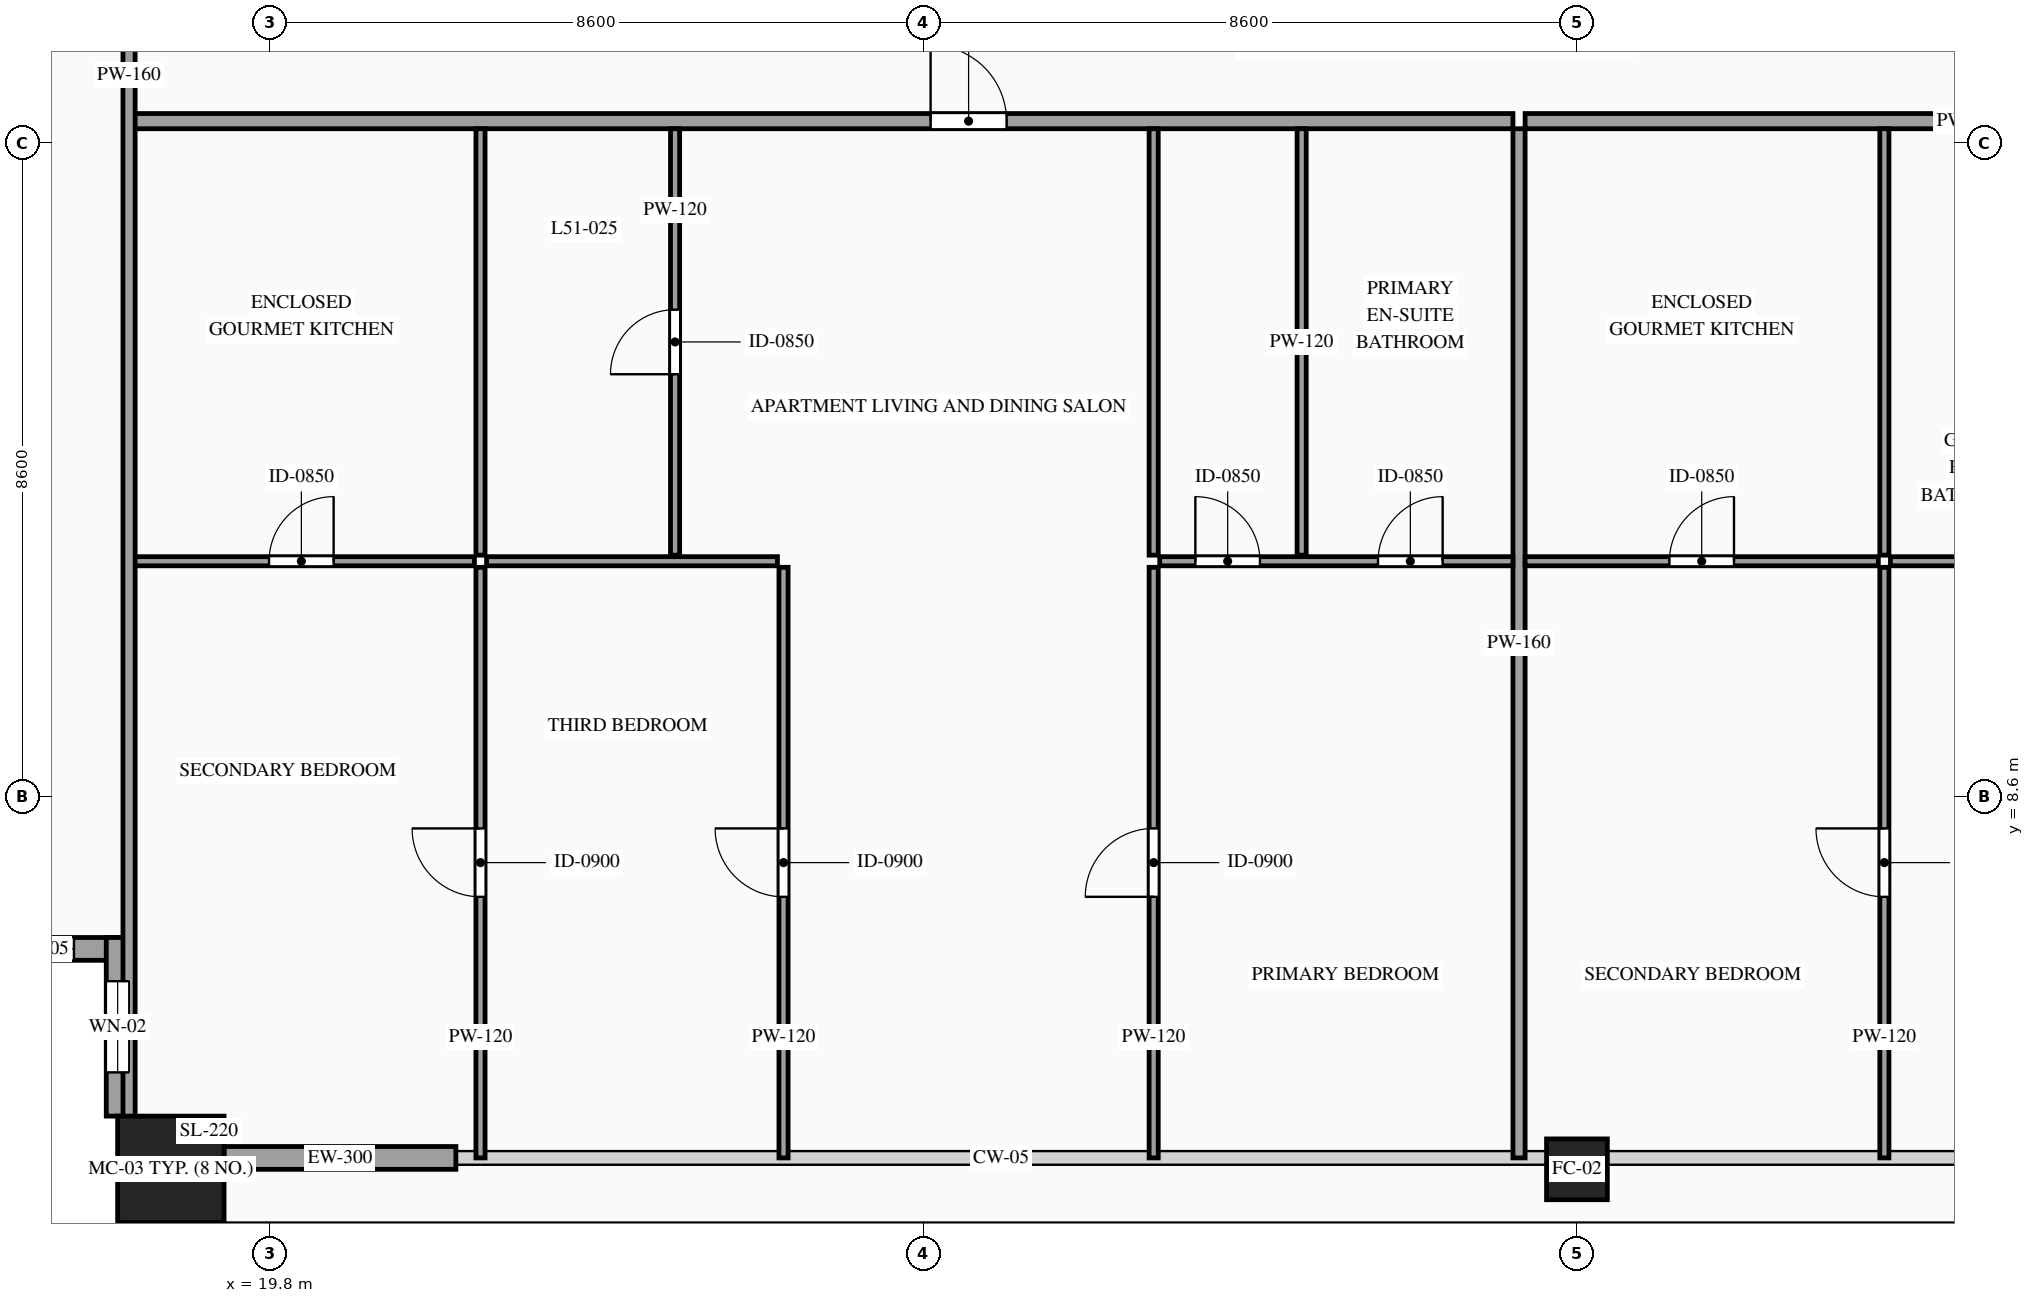
"""IFC4 building model, lengths in metres.
Left out: names, types, materials, properties, quantities, classifications, styles, units other than length and angle.
Written with IfcOpenShell. Run it as: python <this file> out.ifc"""

import sys

from ifc_helpers import new_model, si_unit, direction, frame, frame_2d, origin, origin_2d, place, context, subcontext, project, spatial, rectangle, hollow_rectangle, extrude, source, transform, mapped, element, fill, save


model = new_model("IFC4")
c1 = context("Model", 3, precision=1e-05, world=origin(), true_north=direction((0.0, 1.0)))
c2 = subcontext(c1, "Body", "Model", "MODEL_VIEW")
j1 = project(units=[si_unit("LENGTHUNIT", "METRE"), si_unit("PLANEANGLEUNIT", "RADIAN")], contexts=[c1])
p1 = place(None, origin())
s1 = spatial("IfcSite", under=j1, at=p1, CompositionType="ELEMENT")
p2 = place(p1, origin())
s2 = spatial("IfcBuilding", under=s1, at=p2, CompositionType="ELEMENT")
p3 = place(p2, frame((0.0, 0.0, 195.0)))
s3 = spatial("IfcBuildingStorey", under=s2, at=p3, CompositionType="ELEMENT", Elevation=195.0)
m1 = source(origin(), c2, "Body", "SweptSolid", [
    extrude(hollow_rectangle(XDim=1.4, YDim=1.4, WallThickness=0.06, at=origin_2d()), origin(), (0.0, 0.0, 1.0), 3.5),
])
p4 = place(p3, frame((18.5, 3.7, 0.0), z_axis=(0.0, 0.0, 1.0), x_axis=(1.0, 0.0, 0.0)))
e1 = element("IfcColumn", 1, at=p4, inside=s3, PredefinedType="COLUMN", context=c2, shape_type="MappedRepresentation", body=[
    mapped(m1, transform((0.0, 0.0, 0.0), scale=1.0)),
])
m2 = source(origin(), c2, "Body", "SweptSolid", [
    extrude(hollow_rectangle(XDim=0.8, YDim=0.8, WallThickness=0.036, at=origin_2d()), origin(), (0.0, 0.0, 1.0), 3.5),
])
p5 = place(p3, frame((37.0, 3.7, 0.0), z_axis=(0.0, 0.0, 1.0), x_axis=(1.0, 0.0, 0.0)))
e2 = element("IfcColumn", 2, at=p5, inside=s3, PredefinedType="COLUMN", context=c2, shape_type="MappedRepresentation", body=[
    mapped(m2, transform((0.0, 0.0, 0.0), scale=1.0)),
])
p6 = place(p3, frame((15.6, 6.6, 0.0), z_axis=(0.0, 0.0, 1.0), x_axis=(1.0, 0.0, 0.0)))
e3 = element("IfcWall", 3, at=p6, inside=s3, PredefinedType="SOLIDWALL", context=c2, shape_type="SweptSolid", body=[
    extrude(rectangle(XDim=2.35, YDim=0.3, at=frame_2d((1.175, 0.0))), origin(), (0.0, 0.0, 1.0), 3.28),
])
p7 = place(p6, frame((0.725, 0.0, 0.85)))
e4 = element("IfcOpeningElement", 4, at=p7, cuts=e3, PredefinedType="OPENING", context=c2, shape_type="SweptSolid", body=[
    extrude(rectangle(XDim=0.9, YDim=1.5, at=frame_2d((0.45, 0.75))), frame((0.0, 0.165, 0.0), z_axis=(0.0, -1.0, 0.0), x_axis=(1.0, 0.0, 0.0)), (0.0, 0.0, 1.0), 0.33),
])
p8 = place(p3, frame((17.8, 6.75, 0.0), z_axis=(0.0, 0.0, 1.0), x_axis=(0.0, -1.0, 0.0)))
e5 = element("IfcWall", 5, at=p8, inside=s3, PredefinedType="SOLIDWALL", context=c2, shape_type="SweptSolid", body=[
    extrude(rectangle(XDim=2.35, YDim=0.3, at=frame_2d((1.175, 0.0))), origin(), (0.0, 0.0, 1.0), 3.28),
])
p9 = place(p8, frame((0.575, 0.0, 0.85)))
e6 = element("IfcOpeningElement", 6, at=p9, cuts=e5, PredefinedType="OPENING", context=c2, shape_type="SweptSolid", body=[
    extrude(rectangle(XDim=1.2, YDim=2.1, at=frame_2d((0.6, 1.05))), frame((0.0, 0.165, 0.0), z_axis=(0.0, -1.0, 0.0), x_axis=(1.0, 0.0, 0.0)), (0.0, 0.0, 1.0), 0.33),
])
m3 = source(origin(), c2, "Body", "SweptSolid", [
    extrude(rectangle(XDim=3.05, YDim=0.3, at=frame_2d((1.525, 0.0))), origin(), (0.0, 0.0, 1.0), 2.835),
])
p10 = place(p3, frame((19.2, 3.85, 0.0), z_axis=(0.0, 0.0, 1.0), x_axis=(1.0, 0.0, 0.0)))
e7 = element("IfcWall", 7, at=p10, inside=s3, PredefinedType="SOLIDWALL", context=c2, shape_type="MappedRepresentation", body=[
    mapped(m3, transform((0.0, 0.0, 0.0), scale=1.0)),
])
p11 = place(p3, frame((17.94, 17.49, 0.0), z_axis=(0.0, 0.0, 1.0), x_axis=(1.0, 0.0, 0.0)))
e8 = element("IfcWall", 8, at=p11, inside=s3, PredefinedType="PARTITIONING", context=c2, shape_type="SweptSolid", body=[
    extrude(rectangle(XDim=18.218, YDim=0.2, at=frame_2d((9.109, 0.0))), origin(), (0.0, 0.0, 1.0), 3.28),
])
p12 = place(p11, frame((10.556, 0.0, 0.0)))
e9 = element("IfcOpeningElement", 9, at=p12, cuts=e8, PredefinedType="OPENING", context=c2, shape_type="SweptSolid", body=[
    extrude(rectangle(XDim=1.0, YDim=2.2, at=frame_2d((0.5, 1.1))), frame((0.0, 0.115, 0.0), z_axis=(0.0, -1.0, 0.0), x_axis=(1.0, 0.0, 0.0)), (0.0, 0.0, 1.0), 0.23),
])
m4 = source(origin(), c2, "Body", "SweptSolid", [
    extrude(rectangle(XDim=13.54, YDim=0.16, at=frame_2d((6.77, 0.0))), origin(), (0.0, 0.0, 1.0), 3.28),
])
p13 = place(p3, frame((36.238, 3.85, 0.0), z_axis=(0.0, 0.0, 1.0), x_axis=(0.0, 1.0, 0.0)))
e10 = element("IfcWall", 10, at=p13, inside=s3, PredefinedType="PARTITIONING", context=c2, shape_type="MappedRepresentation", body=[
    mapped(m4, transform((0.0, 0.0, 0.0), scale=1.0)),
])
p14 = place(p3, frame((17.94, 11.7, 0.0), z_axis=(0.0, 0.0, 1.0), x_axis=(1.0, 0.0, 0.0)))
e11 = element("IfcWall", 11, at=p14, inside=s3, PredefinedType="PARTITIONING", context=c2, shape_type="SweptSolid", body=[
    extrude(rectangle(XDim=4.554, YDim=0.12, at=frame_2d((2.277, 0.0))), origin(), (0.0, 0.0, 1.0), 3.28),
])
p15 = place(p14, frame((1.852, 0.0, 0.0)))
e12 = element("IfcOpeningElement", 12, at=p15, cuts=e11, PredefinedType="OPENING", context=c2, shape_type="SweptSolid", body=[
    extrude(rectangle(XDim=0.85, YDim=2.1, at=frame_2d((0.425, 1.05))), frame((0.0, 0.075, 0.0), z_axis=(0.0, -1.0, 0.0), x_axis=(1.0, 0.0, 0.0)), (0.0, 0.0, 1.0), 0.15),
])
m5 = source(origin(), c2, "Body", "SweptSolid", [
    extrude(rectangle(XDim=5.61, YDim=0.12, at=frame_2d((2.805, 0.0))), origin(), (0.0, 0.0, 1.0), 3.28),
])
p16 = place(p3, frame((22.574, 11.78, 0.0), z_axis=(0.0, 0.0, 1.0), x_axis=(0.0, 1.0, 0.0)))
e13 = element("IfcWall", 13, at=p16, inside=s3, PredefinedType="PARTITIONING", context=c2, shape_type="MappedRepresentation", body=[
    mapped(m5, transform((0.0, 0.0, 0.0), scale=1.0)),
])
p17 = place(p3, frame((25.134, 11.78, 0.0), z_axis=(0.0, 0.0, 1.0), x_axis=(0.0, 1.0, 0.0)))
e14 = element("IfcWall", 14, at=p17, inside=s3, PredefinedType="PARTITIONING", context=c2, shape_type="SweptSolid", body=[
    extrude(rectangle(XDim=5.61, YDim=0.12, at=frame_2d((2.805, 0.0))), origin(), (0.0, 0.0, 1.0), 3.28),
])
p18 = place(p17, frame((2.38, 0.0, 0.0)))
e15 = element("IfcOpeningElement", 15, at=p18, cuts=e14, PredefinedType="OPENING", context=c2, shape_type="SweptSolid", body=[
    extrude(rectangle(XDim=0.85, YDim=2.1, at=frame_2d((0.425, 1.05))), frame((0.0, 0.075, 0.0), z_axis=(0.0, -1.0, 0.0), x_axis=(1.0, 0.0, 0.0)), (0.0, 0.0, 1.0), 0.15),
])
for number, where, z_axis, x_axis in (
    (16, (33.378, 11.78, 0.0), (0.0, 0.0, 1.0), (0.0, 1.0, 0.0)),
    (17, (31.431, 11.78, 0.0), (0.0, 0.0, 1.0), (0.0, 1.0, 0.0)),
):
    element("IfcWall", number, at=place(p3, frame(where, z_axis=z_axis, x_axis=x_axis)), inside=s3, PredefinedType="PARTITIONING", context=c2, shape_type="MappedRepresentation", body=[
        mapped(m5, transform((0.0, 0.0, 0.0), scale=1.0)),
    ])
p19 = place(p3, frame((22.574, 3.85, 0.0), z_axis=(0.0, 0.0, 1.0), x_axis=(0.0, 1.0, 0.0)))
e18 = element("IfcWall", 18, at=p19, inside=s3, PredefinedType="PARTITIONING", context=c2, shape_type="SweptSolid", body=[
    extrude(rectangle(XDim=7.77, YDim=0.12, at=frame_2d((3.885, 0.0))), origin(), (0.0, 0.0, 1.0), 3.28),
])
p20 = place(p19, frame((3.435, 0.0, 0.0)))
e19 = element("IfcOpeningElement", 19, at=p20, cuts=e18, PredefinedType="OPENING", context=c2, shape_type="SweptSolid", body=[
    extrude(rectangle(XDim=0.9, YDim=2.15, at=frame_2d((0.45, 1.075))), frame((0.0, 0.075, 0.0), z_axis=(0.0, -1.0, 0.0), x_axis=(1.0, 0.0, 0.0)), (0.0, 0.0, 1.0), 0.15),
])
p21 = place(p3, frame((31.511, 11.7, 0.0), z_axis=(0.0, 0.0, 1.0), x_axis=(1.0, 0.0, 0.0)))
e20 = element("IfcWall", 20, at=p21, inside=s3, PredefinedType="PARTITIONING", context=c2, shape_type="SweptSolid", body=[
    extrude(rectangle(XDim=4.647, YDim=0.12, at=frame_2d((2.323, 0.0))), origin(), (0.0, 0.0, 1.0), 2.875),
])
p22 = place(p21, frame((2.872, 0.0, 0.0)))
e21 = element("IfcOpeningElement", 21, at=p22, cuts=e20, PredefinedType="OPENING", context=c2, shape_type="SweptSolid", body=[
    extrude(rectangle(XDim=0.85, YDim=2.1, at=frame_2d((0.425, 1.05))), frame((0.0, 0.075, 0.0), z_axis=(0.0, -1.0, 0.0), x_axis=(1.0, 0.0, 0.0)), (0.0, 0.0, 1.0), 0.15),
])
p23 = place(p21, frame((0.469, 0.0, 0.0)))
e22 = element("IfcOpeningElement", 22, at=p23, cuts=e20, PredefinedType="OPENING", context=c2, shape_type="SweptSolid", body=[
    extrude(rectangle(XDim=0.85, YDim=2.1, at=frame_2d((0.425, 1.05))), frame((0.0, 0.075, 0.0), z_axis=(0.0, -1.0, 0.0), x_axis=(1.0, 0.0, 0.0)), (0.0, 0.0, 1.0), 0.15),
])
p24 = place(p3, frame((31.431, 3.85, 0.0), z_axis=(0.0, 0.0, 1.0), x_axis=(0.0, 1.0, 0.0)))
e23 = element("IfcWall", 23, at=p24, inside=s3, PredefinedType="PARTITIONING", context=c2, shape_type="SweptSolid", body=[
    extrude(rectangle(XDim=7.77, YDim=0.12, at=frame_2d((3.885, 0.0))), origin(), (0.0, 0.0, 1.0), 3.28),
])
p25 = place(p24, frame((3.435, 0.0, 0.0)))
e24 = element("IfcOpeningElement", 24, at=p25, cuts=e23, PredefinedType="OPENING", context=c2, shape_type="SweptSolid", body=[
    extrude(rectangle(XDim=0.9, YDim=2.15, at=frame_2d((0.45, 1.075))), frame((0.0, 0.075, 0.0), z_axis=(0.0, -1.0, 0.0), x_axis=(1.0, 0.0, 0.0)), (0.0, 0.0, 1.0), 0.15),
])
m6 = source(origin(), c2, "Body", "SweptSolid", [
    extrude(rectangle(XDim=3.827, YDim=0.12, at=frame_2d((1.914, 0.0))), origin(), (0.0, 0.0, 1.0), 2.875),
])
p26 = place(p3, frame((22.654, 11.7, 0.0), z_axis=(0.0, 0.0, 1.0), x_axis=(1.0, 0.0, 0.0)))
e25 = element("IfcWall", 25, at=p26, inside=s3, PredefinedType="PARTITIONING", context=c2, shape_type="MappedRepresentation", body=[
    mapped(m6, transform((0.0, 0.0, 0.0), scale=1.0)),
])
p27 = place(p3, frame((26.561, 3.85, 0.0), z_axis=(0.0, 0.0, 1.0), x_axis=(0.0, 1.0, 0.0)))
e26 = element("IfcWall", 26, at=p27, inside=s3, PredefinedType="PARTITIONING", context=c2, shape_type="SweptSolid", body=[
    extrude(rectangle(XDim=7.77, YDim=0.12, at=frame_2d((3.885, 0.0))), origin(), (0.0, 0.0, 1.0), 3.28),
])
p28 = place(p27, frame((3.435, 0.0, 0.0)))
e27 = element("IfcOpeningElement", 27, at=p28, cuts=e26, PredefinedType="OPENING", context=c2, shape_type="SweptSolid", body=[
    extrude(rectangle(XDim=0.9, YDim=2.15, at=frame_2d((0.45, 1.075))), frame((0.0, 0.075, 0.0), z_axis=(0.0, -1.0, 0.0), x_axis=(1.0, 0.0, 0.0)), (0.0, 0.0, 1.0), 0.15),
])
p29 = place(p3, frame((36.318, 17.49, 0.0), z_axis=(0.0, 0.0, 1.0), x_axis=(1.0, 0.0, 0.0)))
e28 = element("IfcWall", 28, at=p29, inside=s3, PredefinedType="PARTITIONING", context=c2, shape_type="SweptSolid", body=[
    extrude(rectangle(XDim=19.742, YDim=0.2, at=frame_2d((9.871, 0.0))), origin(), (0.0, 0.0, 1.0), 3.28),
])
p30 = place(p29, frame((11.915, 0.0, 0.0)))
e29 = element("IfcOpeningElement", 29, at=p30, cuts=e28, PredefinedType="OPENING", context=c2, shape_type="SweptSolid", body=[
    extrude(rectangle(XDim=1.0, YDim=2.2, at=frame_2d((0.5, 1.1))), frame((0.0, 0.115, 0.0), z_axis=(0.0, -1.0, 0.0), x_axis=(1.0, 0.0, 0.0)), (0.0, 0.0, 1.0), 0.23),
])
p31 = place(p3, frame((36.318, 11.7, 0.0), z_axis=(0.0, 0.0, 1.0), x_axis=(1.0, 0.0, 0.0)))
e30 = element("IfcWall", 30, at=p31, inside=s3, PredefinedType="PARTITIONING", context=c2, shape_type="SweptSolid", body=[
    extrude(rectangle(XDim=4.647, YDim=0.12, at=frame_2d((2.323, 0.0))), origin(), (0.0, 0.0, 1.0), 2.875),
])
p32 = place(p31, frame((1.898, 0.0, 0.0)))
e31 = element("IfcOpeningElement", 31, at=p32, cuts=e30, PredefinedType="OPENING", context=c2, shape_type="SweptSolid", body=[
    extrude(rectangle(XDim=0.85, YDim=2.1, at=frame_2d((0.425, 1.05))), frame((0.0, 0.075, 0.0), z_axis=(0.0, -1.0, 0.0), x_axis=(1.0, 0.0, 0.0)), (0.0, 0.0, 1.0), 0.15),
])
p33 = place(p3, frame((41.045, 11.78, 0.0), z_axis=(0.0, 0.0, 1.0), x_axis=(0.0, 1.0, 0.0)))
e32 = element("IfcWall", 32, at=p33, inside=s3, PredefinedType="PARTITIONING", context=c2, shape_type="MappedRepresentation", body=[
    mapped(m5, transform((0.0, 0.0, 0.0), scale=1.0)),
])
p34 = place(p3, frame((41.045, 3.85, 0.0), z_axis=(0.0, 0.0, 1.0), x_axis=(0.0, 1.0, 0.0)))
e33 = element("IfcWall", 33, at=p34, inside=s3, PredefinedType="PARTITIONING", context=c2, shape_type="SweptSolid", body=[
    extrude(rectangle(XDim=7.77, YDim=0.12, at=frame_2d((3.885, 0.0))), origin(), (0.0, 0.0, 1.0), 3.28),
])
p35 = place(p34, frame((3.435, 0.0, 0.0)))
e34 = element("IfcOpeningElement", 34, at=p35, cuts=e33, PredefinedType="OPENING", context=c2, shape_type="SweptSolid", body=[
    extrude(rectangle(XDim=0.9, YDim=2.15, at=frame_2d((0.45, 1.075))), frame((0.0, 0.075, 0.0), z_axis=(0.0, -1.0, 0.0), x_axis=(1.0, 0.0, 0.0)), (0.0, 0.0, 1.0), 0.15),
])
m7 = source(origin(), c2, "Body", "SweptSolid", [
    extrude(rectangle(XDim=4.928, YDim=0.12, at=frame_2d((2.464, 0.0))), origin(), (0.0, 0.0, 1.0), 2.875),
])
p36 = place(p3, frame((41.125, 11.7, 0.0), z_axis=(0.0, 0.0, 1.0), x_axis=(1.0, 0.0, 0.0)))
e35 = element("IfcWall", 35, at=p36, inside=s3, PredefinedType="PARTITIONING", context=c2, shape_type="MappedRepresentation", body=[
    mapped(m7, transform((0.0, 0.0, 0.0), scale=1.0)),
])
m8 = source(origin(), c2, "Body", "SweptSolid", [
    extrude(rectangle(XDim=28.19, YDim=0.16, at=frame_2d((14.095, 0.0))), origin(), (0.0, 0.0, 1.0), 3.28),
])
p37 = place(p3, frame((17.95, 4.0, 0.0), z_axis=(0.0, 0.0, 1.0), x_axis=(0.0, 1.0, 0.0)))
e36 = element("IfcWall", 36, at=p37, inside=s3, PredefinedType="PARTITIONING", context=c2, shape_type="MappedRepresentation", body=[
    mapped(m8, transform((0.0, 0.0, 0.0), scale=1.0)),
])
m9 = source(origin(), c2, "Body", "SweptSolid", [
    extrude(rectangle(XDim=0.9, YDim=1.5, at=frame_2d((0.45, 0.75))), frame((0.0, 0.03, 0.0), z_axis=(0.0, -1.0, 0.0), x_axis=(1.0, 0.0, 0.0)), (0.0, 0.0, 1.0), 0.06),
])
p38 = place(p7, origin())
e37 = element("IfcWindow", 37, at=p38, inside=s3, PartitioningType="SINGLE_PANEL", PredefinedType="WINDOW", context=c2, shape_type="MappedRepresentation", body=[
    mapped(m9, transform((0.0, 0.0, 0.0), scale=1.0)),
])
fill(e4, e37)
m10 = source(origin(), c2, "Body", "SweptSolid", [
    extrude(rectangle(XDim=1.2, YDim=2.1, at=frame_2d((0.6, 1.05))), frame((0.0, 0.03, 0.0), z_axis=(0.0, -1.0, 0.0), x_axis=(1.0, 0.0, 0.0)), (0.0, 0.0, 1.0), 0.06),
])
p39 = place(p9, origin())
e38 = element("IfcWindow", 38, at=p39, inside=s3, PartitioningType="SINGLE_PANEL", PredefinedType="WINDOW", context=c2, shape_type="MappedRepresentation", body=[
    mapped(m10, transform((0.0, 0.0, 0.0), scale=1.0)),
])
fill(e6, e38)
m11 = source(origin(), c2, "Body", "SweptSolid", [
    extrude(rectangle(XDim=1.0, YDim=2.2, at=frame_2d((0.5, 1.1))), frame((0.0, 0.025, 0.0), z_axis=(0.0, -1.0, 0.0), x_axis=(1.0, 0.0, 0.0)), (0.0, 0.0, 1.0), 0.05),
])
p40 = place(p12, origin())
e39 = element("IfcDoor", 39, at=p40, inside=s3, OperationType="SINGLE_SWING_LEFT", PredefinedType="DOOR", context=c2, shape_type="MappedRepresentation", body=[
    mapped(m11, transform((0.0, 0.0, 0.0), scale=1.0)),
])
fill(e9, e39)
m12 = source(origin(), c2, "Body", "SweptSolid", [
    extrude(rectangle(XDim=0.85, YDim=2.1, at=frame_2d((0.425, 1.05))), frame((0.0, 0.025, 0.0), z_axis=(0.0, -1.0, 0.0), x_axis=(1.0, 0.0, 0.0)), (0.0, 0.0, 1.0), 0.05),
])
p41 = place(p15, origin())
e40 = element("IfcDoor", 40, at=p41, inside=s3, OperationType="SINGLE_SWING_RIGHT", PredefinedType="DOOR", context=c2, shape_type="MappedRepresentation", body=[
    mapped(m12, transform((0.0, 0.0, 0.0), scale=1.0)),
])
fill(e12, e40)
p42 = place(p18, origin())
e41 = element("IfcDoor", 41, at=p42, inside=s3, OperationType="SINGLE_SWING_LEFT", PredefinedType="DOOR", context=c2, shape_type="MappedRepresentation", body=[
    mapped(m12, transform((0.0, 0.0, 0.0), scale=1.0)),
])
fill(e15, e41)
p43 = place(p22, origin())
e42 = element("IfcDoor", 42, at=p43, inside=s3, OperationType="SINGLE_SWING_RIGHT", PredefinedType="DOOR", context=c2, shape_type="MappedRepresentation", body=[
    mapped(m12, transform((0.0, 0.0, 0.0), scale=1.0)),
])
fill(e21, e42)
p44 = place(p23, origin())
e43 = element("IfcDoor", 43, at=p44, inside=s3, OperationType="SINGLE_SWING_LEFT", PredefinedType="DOOR", context=c2, shape_type="MappedRepresentation", body=[
    mapped(m12, transform((0.0, 0.0, 0.0), scale=1.0)),
])
fill(e22, e43)
m13 = source(origin(), c2, "Body", "SweptSolid", [
    extrude(rectangle(XDim=0.9, YDim=2.15, at=frame_2d((0.45, 1.075))), frame((0.0, 0.025, 0.0), z_axis=(0.0, -1.0, 0.0), x_axis=(1.0, 0.0, 0.0)), (0.0, 0.0, 1.0), 0.05),
])
p45 = place(p20, origin())
e44 = element("IfcDoor", 44, at=p45, inside=s3, OperationType="SINGLE_SWING_RIGHT", PredefinedType="DOOR", context=c2, shape_type="MappedRepresentation", body=[
    mapped(m13, transform((0.0, 0.0, 0.0), scale=1.0)),
])
fill(e19, e44)
p46 = place(p25, origin())
e45 = element("IfcDoor", 45, at=p46, inside=s3, OperationType="SINGLE_SWING_LEFT", PredefinedType="DOOR", context=c2, shape_type="MappedRepresentation", body=[
    mapped(m13, transform((0.0, 0.0, 0.0), scale=1.0)),
])
fill(e24, e45)
p47 = place(p28, origin())
e46 = element("IfcDoor", 46, at=p47, inside=s3, OperationType="SINGLE_SWING_RIGHT", PredefinedType="DOOR", context=c2, shape_type="MappedRepresentation", body=[
    mapped(m13, transform((0.0, 0.0, 0.0), scale=1.0)),
])
fill(e27, e46)
p48 = place(p32, origin())
e47 = element("IfcDoor", 47, at=p48, inside=s3, OperationType="SINGLE_SWING_RIGHT", PredefinedType="DOOR", context=c2, shape_type="MappedRepresentation", body=[
    mapped(m12, transform((0.0, 0.0, 0.0), scale=1.0)),
])
fill(e31, e47)
p49 = place(p35, origin())
e48 = element("IfcDoor", 48, at=p49, inside=s3, OperationType="SINGLE_SWING_RIGHT", PredefinedType="DOOR", context=c2, shape_type="MappedRepresentation", body=[
    mapped(m13, transform((0.0, 0.0, 0.0), scale=1.0)),
])
fill(e34, e48)
save(model, sys.argv[1])
